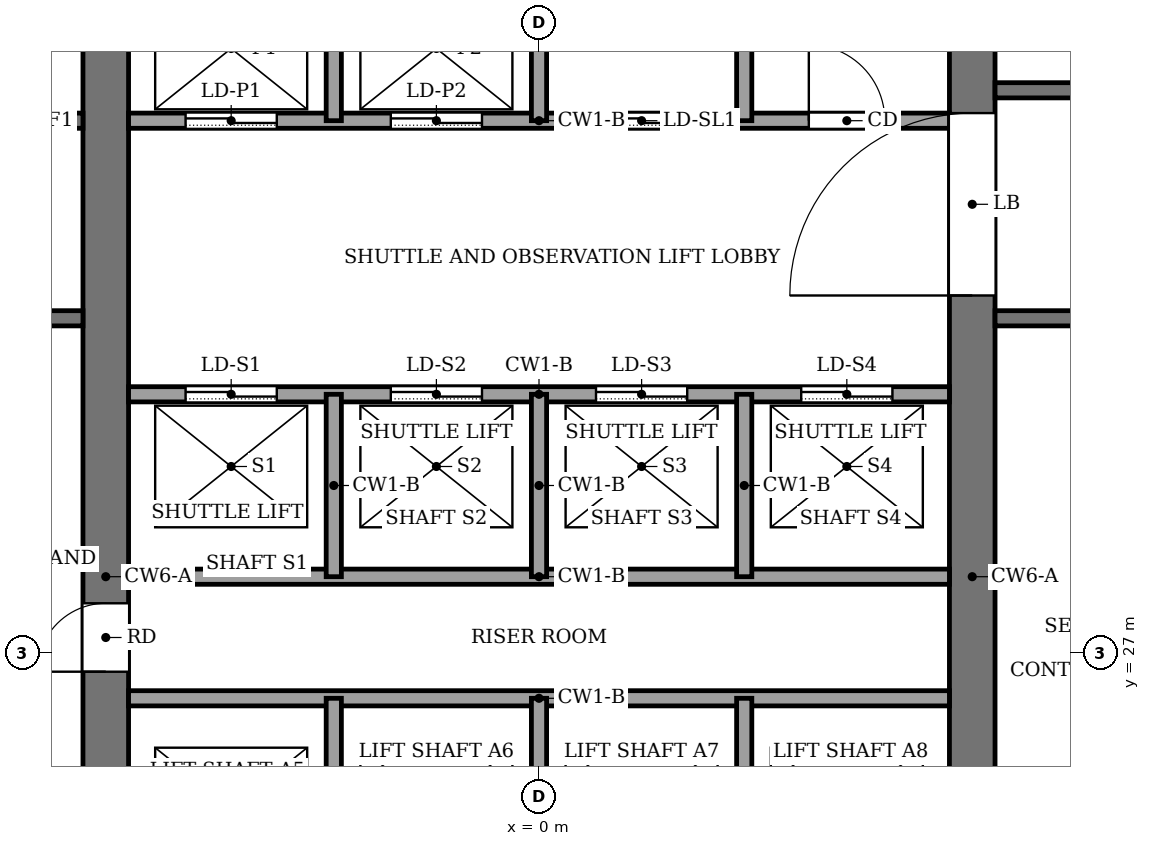
"""IFC4 building model, lengths in metres.
Left out: names, types, materials, properties, quantities, classifications, styles, units other than length and angle.
Written with IfcOpenShell. Run it as: python <this file> out.ifc"""

import sys

from ifc_helpers import new_model, si_unit, direction, frame, frame_2d, origin, place, context, subcontext, project, spatial, rectangle, extrude, element, fill, save


model = new_model("IFC4")
c1 = context("Model", 3, precision=1e-05, world=origin(), true_north=direction((0.0, 1.0)))
c2 = subcontext(c1, "Body", "Model", "MODEL_VIEW")
j1 = project(units=[si_unit("LENGTHUNIT", "METRE"), si_unit("PLANEANGLEUNIT", "RADIAN")], contexts=[c1])
p1 = place(None, origin())
s1 = spatial("IfcSite", under=j1, at=p1, CompositionType="ELEMENT")
p2 = place(p1, origin())
s2 = spatial("IfcBuilding", under=s1, at=p2, CompositionType="ELEMENT")
p3 = place(p2, origin())
s3 = spatial("IfcBuildingStorey", under=s2, at=p3, CompositionType="ELEMENT", Elevation=0.0)
p4 = place(p3, frame((-5.7, 18.4, -0.45), z_axis=(0.0, 0.0, 1.0), x_axis=(0.0, 1.0, 0.0)))
e1 = element("IfcWall", 1, at=p4, inside=s3, PredefinedType="SHEAR", context=c2, shape_type="SweptSolid", body=[
    extrude(rectangle(XDim=19.2, YDim=0.6, at=frame_2d((9.6, 0.0))), origin(), (0.0, 0.0, 1.0), 9.32),
])
p5 = place(p4, frame((8.35, 0.0, 0.45)))
e2 = element("IfcOpeningElement", 2, at=p5, cuts=e1, PredefinedType="OPENING", context=c2, shape_type="SweptSolid", body=[
    extrude(rectangle(XDim=0.9, YDim=2.1, at=frame_2d((0.45, 1.05))), frame((0.0, 0.31, 0.0), z_axis=(0.0, -1.0, 0.0), x_axis=(1.0, 0.0, 0.0)), (0.0, 0.0, 1.0), 0.62),
])
p6 = place(p3, frame((5.7, 18.4, -0.45), z_axis=(0.0, 0.0, 1.0), x_axis=(0.0, 1.0, 0.0)))
e3 = element("IfcWall", 3, at=p6, inside=s3, PredefinedType="SHEAR", context=c2, shape_type="SweptSolid", body=[
    extrude(rectangle(XDim=19.2, YDim=0.6, at=frame_2d((9.6, 0.0))), origin(), (0.0, 0.0, 1.0), 9.32),
])
p7 = place(p6, frame((13.3, 0.0, 0.45)))
e4 = element("IfcOpeningElement", 4, at=p7, cuts=e3, PredefinedType="OPENING", context=c2, shape_type="SweptSolid", body=[
    extrude(rectangle(XDim=2.4, YDim=2.4, at=frame_2d((1.2, 1.2))), frame((0.0, 0.31, 0.0), z_axis=(0.0, -1.0, 0.0), x_axis=(1.0, 0.0, 0.0)), (0.0, 0.0, 1.0), 0.62),
])
for number, where, z_axis, x_axis in (
    (5, (-5.4, 26.4, 0.0), (0.0, 0.0, 1.0), (1.0, 0.0, 0.0)),
    (6, (-5.4, 28.0, 0.0), (0.0, 0.0, 1.0), (1.0, 0.0, 0.0)),
):
    element("IfcWall", number, at=place(p3, frame(where, z_axis=z_axis, x_axis=x_axis)), inside=s3, PredefinedType="PARTITIONING", context=c2, shape_type="SweptSolid", body=[
        extrude(rectangle(XDim=10.8, YDim=0.2, at=frame_2d((5.4, 0.0))), origin(), (0.0, 0.0, 1.0), 8.87),
    ])
p8 = place(p3, frame((-5.4, 30.4, 0.0), z_axis=(0.0, 0.0, 1.0), x_axis=(1.0, 0.0, 0.0)))
e7 = element("IfcWall", 7, at=p8, inside=s3, PredefinedType="PARTITIONING", context=c2, shape_type="SweptSolid", body=[
    extrude(rectangle(XDim=10.8, YDim=0.2, at=frame_2d((5.4, 0.0))), origin(), (0.0, 0.0, 1.0), 8.87),
])
p9 = place(p8, frame((0.75, 0.0, 0.0)))
e8 = element("IfcOpeningElement", 8, at=p9, cuts=e7, PredefinedType="OPENING", context=c2, shape_type="SweptSolid", body=[
    extrude(rectangle(XDim=1.2, YDim=2.2, at=frame_2d((0.6, 1.1))), frame((0.0, 0.11, 0.0), z_axis=(0.0, -1.0, 0.0), x_axis=(1.0, 0.0, 0.0)), (0.0, 0.0, 1.0), 0.22),
])
p10 = place(p8, frame((3.45, 0.0, 0.0)))
e9 = element("IfcOpeningElement", 9, at=p10, cuts=e7, PredefinedType="OPENING", context=c2, shape_type="SweptSolid", body=[
    extrude(rectangle(XDim=1.2, YDim=2.2, at=frame_2d((0.6, 1.1))), frame((0.0, 0.11, 0.0), z_axis=(0.0, -1.0, 0.0), x_axis=(1.0, 0.0, 0.0)), (0.0, 0.0, 1.0), 0.22),
])
p11 = place(p8, frame((6.15, 0.0, 0.0)))
e10 = element("IfcOpeningElement", 10, at=p11, cuts=e7, PredefinedType="OPENING", context=c2, shape_type="SweptSolid", body=[
    extrude(rectangle(XDim=1.2, YDim=2.2, at=frame_2d((0.6, 1.1))), frame((0.0, 0.11, 0.0), z_axis=(0.0, -1.0, 0.0), x_axis=(1.0, 0.0, 0.0)), (0.0, 0.0, 1.0), 0.22),
])
p12 = place(p8, frame((8.85, 0.0, 0.0)))
e11 = element("IfcOpeningElement", 11, at=p12, cuts=e7, PredefinedType="OPENING", context=c2, shape_type="SweptSolid", body=[
    extrude(rectangle(XDim=1.2, YDim=2.2, at=frame_2d((0.6, 1.1))), frame((0.0, 0.11, 0.0), z_axis=(0.0, -1.0, 0.0), x_axis=(1.0, 0.0, 0.0)), (0.0, 0.0, 1.0), 0.22),
])
p13 = place(p3, frame((-12.6, 31.4, 0.0), z_axis=(0.0, 0.0, 1.0), x_axis=(1.0, 0.0, 0.0)))
e12 = element("IfcWall", 12, at=p13, inside=s3, PredefinedType="PARTITIONING", context=c2, shape_type="SweptSolid", body=[
    extrude(rectangle(XDim=6.6, YDim=0.2, at=frame_2d((3.3, 0.0))), origin(), (0.0, 0.0, 1.0), 8.87),
])
p14 = place(p13, frame((1.0, 0.0, 0.0)))
e13 = element("IfcOpeningElement", 13, at=p14, cuts=e12, PredefinedType="OPENING", context=c2, shape_type="SweptSolid", body=[
    extrude(rectangle(XDim=1.2, YDim=2.2, at=frame_2d((0.6, 1.1))), frame((0.0, 0.11, 0.0), z_axis=(0.0, -1.0, 0.0), x_axis=(1.0, 0.0, 0.0)), (0.0, 0.0, 1.0), 0.22),
])
p15 = place(p3, frame((6.0, 31.4, 0.0), z_axis=(0.0, 0.0, 1.0), x_axis=(1.0, 0.0, 0.0)))
e14 = element("IfcWall", 14, at=p15, inside=s3, PredefinedType="PARTITIONING", context=c2, shape_type="SweptSolid", body=[
    extrude(rectangle(XDim=6.6, YDim=0.2, at=frame_2d((3.3, 0.0))), origin(), (0.0, 0.0, 1.0), 8.87),
])
p16 = place(p3, frame((-12.6, 34.0, 0.0), z_axis=(0.0, 0.0, 1.0), x_axis=(1.0, 0.0, 0.0)))
e15 = element("IfcWall", 15, at=p16, inside=s3, PredefinedType="PARTITIONING", context=c2, shape_type="SweptSolid", body=[
    extrude(rectangle(XDim=6.6, YDim=0.2, at=frame_2d((3.3, 0.0))), origin(), (0.0, 0.0, 1.0), 8.87),
])
p17 = place(p16, frame((4.7, 0.0, 0.0)))
e16 = element("IfcOpeningElement", 16, at=p17, cuts=e15, PredefinedType="OPENING", context=c2, shape_type="SweptSolid", body=[
    extrude(rectangle(XDim=1.4, YDim=2.2, at=frame_2d((0.7, 1.1))), frame((0.0, 0.11, 0.0), z_axis=(0.0, -1.0, 0.0), x_axis=(1.0, 0.0, 0.0)), (0.0, 0.0, 1.0), 0.22),
])
p18 = place(p16, frame((2.3, 0.0, 0.0)))
e17 = element("IfcOpeningElement", 17, at=p18, cuts=e15, PredefinedType="OPENING", context=c2, shape_type="SweptSolid", body=[
    extrude(rectangle(XDim=1.4, YDim=2.2, at=frame_2d((0.7, 1.1))), frame((0.0, 0.11, 0.0), z_axis=(0.0, -1.0, 0.0), x_axis=(1.0, 0.0, 0.0)), (0.0, 0.0, 1.0), 0.22),
])
p19 = place(p16, frame((0.45, 0.0, 0.0)))
e18 = element("IfcOpeningElement", 18, at=p19, cuts=e15, PredefinedType="OPENING", context=c2, shape_type="SweptSolid", body=[
    extrude(rectangle(XDim=0.9, YDim=2.1, at=frame_2d((0.45, 1.05))), frame((0.0, 0.11, 0.0), z_axis=(0.0, -1.0, 0.0), x_axis=(1.0, 0.0, 0.0)), (0.0, 0.0, 1.0), 0.22),
])
p20 = place(p3, frame((-5.4, 34.0, 0.0), z_axis=(0.0, 0.0, 1.0), x_axis=(1.0, 0.0, 0.0)))
e19 = element("IfcWall", 19, at=p20, inside=s3, PredefinedType="PARTITIONING", context=c2, shape_type="SweptSolid", body=[
    extrude(rectangle(XDim=10.8, YDim=0.2, at=frame_2d((5.4, 0.0))), origin(), (0.0, 0.0, 1.0), 8.87),
])
p21 = place(p20, frame((0.75, 0.0, 0.0)))
e20 = element("IfcOpeningElement", 20, at=p21, cuts=e19, PredefinedType="OPENING", context=c2, shape_type="SweptSolid", body=[
    extrude(rectangle(XDim=1.2, YDim=2.2, at=frame_2d((0.6, 1.1))), frame((0.0, 0.11, 0.0), z_axis=(0.0, -1.0, 0.0), x_axis=(1.0, 0.0, 0.0)), (0.0, 0.0, 1.0), 0.22),
])
p22 = place(p20, frame((3.45, 0.0, 0.0)))
e21 = element("IfcOpeningElement", 21, at=p22, cuts=e19, PredefinedType="OPENING", context=c2, shape_type="SweptSolid", body=[
    extrude(rectangle(XDim=1.2, YDim=2.2, at=frame_2d((0.6, 1.1))), frame((0.0, 0.11, 0.0), z_axis=(0.0, -1.0, 0.0), x_axis=(1.0, 0.0, 0.0)), (0.0, 0.0, 1.0), 0.22),
])
p23 = place(p20, frame((6.15, 0.0, 0.0)))
e22 = element("IfcOpeningElement", 22, at=p23, cuts=e19, PredefinedType="OPENING", context=c2, shape_type="SweptSolid", body=[
    extrude(rectangle(XDim=1.2, YDim=2.2, at=frame_2d((0.6, 1.1))), frame((0.0, 0.11, 0.0), z_axis=(0.0, -1.0, 0.0), x_axis=(1.0, 0.0, 0.0)), (0.0, 0.0, 1.0), 0.22),
])
p24 = place(p20, frame((8.95, 0.0, 0.0)))
e23 = element("IfcOpeningElement", 23, at=p24, cuts=e19, PredefinedType="OPENING", context=c2, shape_type="SweptSolid", body=[
    extrude(rectangle(XDim=1.0, YDim=2.1, at=frame_2d((0.5, 1.05))), frame((0.0, 0.11, 0.0), z_axis=(0.0, -1.0, 0.0), x_axis=(1.0, 0.0, 0.0)), (0.0, 0.0, 1.0), 0.22),
])
p25 = place(p3, frame((6.0, 34.4, 0.0), z_axis=(0.0, 0.0, 1.0), x_axis=(1.0, 0.0, 0.0)))
e24 = element("IfcWall", 24, at=p25, inside=s3, PredefinedType="PARTITIONING", context=c2, shape_type="SweptSolid", body=[
    extrude(rectangle(XDim=6.6, YDim=0.2, at=frame_2d((3.3, 0.0))), origin(), (0.0, 0.0, 1.0), 8.87),
])
p26 = place(p25, frame((4.8, 0.0, 0.0)))
e25 = element("IfcOpeningElement", 25, at=p26, cuts=e24, PredefinedType="OPENING", context=c2, shape_type="SweptSolid", body=[
    extrude(rectangle(XDim=1.2, YDim=2.2, at=frame_2d((0.6, 1.1))), frame((0.0, 0.11, 0.0), z_axis=(0.0, -1.0, 0.0), x_axis=(1.0, 0.0, 0.0)), (0.0, 0.0, 1.0), 0.22),
])
for number, where, z_axis, x_axis in (
    (26, (-2.7, 24.0, 0.0), (0.0, 0.0, 1.0), (0.0, 1.0, 0.0)),
    (27, (-2.7, 28.0, 0.0), (0.0, 0.0, 1.0), (0.0, 1.0, 0.0)),
):
    element("IfcWall", number, at=place(p3, frame(where, z_axis=z_axis, x_axis=x_axis)), inside=s3, PredefinedType="PARTITIONING", context=c2, shape_type="SweptSolid", body=[
        extrude(rectangle(XDim=2.4, YDim=0.2, at=frame_2d((1.2, 0.0))), origin(), (0.0, 0.0, 1.0), 8.87),
    ])
p27 = place(p3, frame((-2.7, 34.0, 0.0), z_axis=(0.0, 0.0, 1.0), x_axis=(0.0, 1.0, 0.0)))
e28 = element("IfcWall", 28, at=p27, inside=s3, PredefinedType="PARTITIONING", context=c2, shape_type="SweptSolid", body=[
    extrude(rectangle(XDim=3.6, YDim=0.2, at=frame_2d((1.8, 0.0))), origin(), (0.0, 0.0, 1.0), 8.87),
])
for number, where, z_axis, x_axis in (
    (29, (0.0, 24.0, 0.0), (0.0, 0.0, 1.0), (0.0, 1.0, 0.0)),
    (30, (0.0, 28.0, 0.0), (0.0, 0.0, 1.0), (0.0, 1.0, 0.0)),
):
    element("IfcWall", number, at=place(p3, frame(where, z_axis=z_axis, x_axis=x_axis)), inside=s3, PredefinedType="PARTITIONING", context=c2, shape_type="SweptSolid", body=[
        extrude(rectangle(XDim=2.4, YDim=0.2, at=frame_2d((1.2, 0.0))), origin(), (0.0, 0.0, 1.0), 8.87),
    ])
p28 = place(p3, frame((0.0, 34.0, 0.0), z_axis=(0.0, 0.0, 1.0), x_axis=(0.0, 1.0, 0.0)))
e31 = element("IfcWall", 31, at=p28, inside=s3, PredefinedType="PARTITIONING", context=c2, shape_type="SweptSolid", body=[
    extrude(rectangle(XDim=3.6, YDim=0.2, at=frame_2d((1.8, 0.0))), origin(), (0.0, 0.0, 1.0), 8.87),
])
for number, where, z_axis, x_axis in (
    (32, (2.7, 24.0, 0.0), (0.0, 0.0, 1.0), (0.0, 1.0, 0.0)),
    (33, (2.7, 28.0, 0.0), (0.0, 0.0, 1.0), (0.0, 1.0, 0.0)),
):
    element("IfcWall", number, at=place(p3, frame(where, z_axis=z_axis, x_axis=x_axis)), inside=s3, PredefinedType="PARTITIONING", context=c2, shape_type="SweptSolid", body=[
        extrude(rectangle(XDim=2.4, YDim=0.2, at=frame_2d((1.2, 0.0))), origin(), (0.0, 0.0, 1.0), 8.87),
    ])
p29 = place(p3, frame((2.7, 34.0, 0.0), z_axis=(0.0, 0.0, 1.0), x_axis=(0.0, 1.0, 0.0)))
e34 = element("IfcWall", 34, at=p29, inside=s3, PredefinedType="PARTITIONING", context=c2, shape_type="SweptSolid", body=[
    extrude(rectangle(XDim=3.6, YDim=0.2, at=frame_2d((1.8, 0.0))), origin(), (0.0, 0.0, 1.0), 8.87),
])
p30 = place(p9, origin())
e35 = element("IfcDoor", 35, at=p30, inside=s3, OperationType="SLIDING_TO_LEFT", PredefinedType="DOOR", context=c2, shape_type="SweptSolid", body=[
    extrude(rectangle(XDim=1.2, YDim=2.2, at=frame_2d((0.6, 1.1))), frame((0.0, 0.025, 0.0), z_axis=(0.0, -1.0, 0.0), x_axis=(1.0, 0.0, 0.0)), (0.0, 0.0, 1.0), 0.05),
])
fill(e8, e35)
p31 = place(p10, origin())
e36 = element("IfcDoor", 36, at=p31, inside=s3, OperationType="SLIDING_TO_LEFT", PredefinedType="DOOR", context=c2, shape_type="SweptSolid", body=[
    extrude(rectangle(XDim=1.2, YDim=2.2, at=frame_2d((0.6, 1.1))), frame((0.0, 0.025, 0.0), z_axis=(0.0, -1.0, 0.0), x_axis=(1.0, 0.0, 0.0)), (0.0, 0.0, 1.0), 0.05),
])
fill(e9, e36)
p32 = place(p11, origin())
e37 = element("IfcDoor", 37, at=p32, inside=s3, OperationType="SLIDING_TO_LEFT", PredefinedType="DOOR", context=c2, shape_type="SweptSolid", body=[
    extrude(rectangle(XDim=1.2, YDim=2.2, at=frame_2d((0.6, 1.1))), frame((0.0, 0.025, 0.0), z_axis=(0.0, -1.0, 0.0), x_axis=(1.0, 0.0, 0.0)), (0.0, 0.0, 1.0), 0.05),
])
fill(e10, e37)
p33 = place(p12, origin())
e38 = element("IfcDoor", 38, at=p33, inside=s3, OperationType="SLIDING_TO_LEFT", PredefinedType="DOOR", context=c2, shape_type="SweptSolid", body=[
    extrude(rectangle(XDim=1.2, YDim=2.2, at=frame_2d((0.6, 1.1))), frame((0.0, 0.025, 0.0), z_axis=(0.0, -1.0, 0.0), x_axis=(1.0, 0.0, 0.0)), (0.0, 0.0, 1.0), 0.05),
])
fill(e11, e38)
p34 = place(p21, origin())
e39 = element("IfcDoor", 39, at=p34, inside=s3, OperationType="SLIDING_TO_LEFT", PredefinedType="DOOR", context=c2, shape_type="SweptSolid", body=[
    extrude(rectangle(XDim=1.2, YDim=2.2, at=frame_2d((0.6, 1.1))), frame((0.0, 0.025, 0.0), z_axis=(0.0, -1.0, 0.0), x_axis=(1.0, 0.0, 0.0)), (0.0, 0.0, 1.0), 0.05),
])
fill(e20, e39)
p35 = place(p22, origin())
e40 = element("IfcDoor", 40, at=p35, inside=s3, OperationType="SLIDING_TO_LEFT", PredefinedType="DOOR", context=c2, shape_type="SweptSolid", body=[
    extrude(rectangle(XDim=1.2, YDim=2.2, at=frame_2d((0.6, 1.1))), frame((0.0, 0.025, 0.0), z_axis=(0.0, -1.0, 0.0), x_axis=(1.0, 0.0, 0.0)), (0.0, 0.0, 1.0), 0.05),
])
fill(e21, e40)
p36 = place(p23, origin())
e41 = element("IfcDoor", 41, at=p36, inside=s3, OperationType="SLIDING_TO_LEFT", PredefinedType="DOOR", context=c2, shape_type="SweptSolid", body=[
    extrude(rectangle(XDim=1.2, YDim=2.2, at=frame_2d((0.6, 1.1))), frame((0.0, 0.025, 0.0), z_axis=(0.0, -1.0, 0.0), x_axis=(1.0, 0.0, 0.0)), (0.0, 0.0, 1.0), 0.05),
])
fill(e22, e41)
p37 = place(p24, origin())
e42 = element("IfcDoor", 42, at=p37, inside=s3, OperationType="SINGLE_SWING_LEFT", PredefinedType="DOOR", context=c2, shape_type="SweptSolid", body=[
    extrude(rectangle(XDim=1.0, YDim=2.1, at=frame_2d((0.5, 1.05))), frame((0.0, 0.025, 0.0), z_axis=(0.0, -1.0, 0.0), x_axis=(1.0, 0.0, 0.0)), (0.0, 0.0, 1.0), 0.05),
])
fill(e23, e42)
p38 = place(p5, origin())
e43 = element("IfcDoor", 43, at=p38, inside=s3, OperationType="SINGLE_SWING_RIGHT", PredefinedType="DOOR", context=c2, shape_type="SweptSolid", body=[
    extrude(rectangle(XDim=0.9, YDim=2.1, at=frame_2d((0.45, 1.05))), frame((0.0, 0.025, 0.0), z_axis=(0.0, -1.0, 0.0), x_axis=(1.0, 0.0, 0.0)), (0.0, 0.0, 1.0), 0.05),
])
fill(e2, e43)
p39 = place(p7, origin())
e44 = element("IfcDoor", 44, at=p39, inside=s3, OperationType="DOUBLE_DOOR_SINGLE_SWING", PredefinedType="DOOR", context=c2, shape_type="SweptSolid", body=[
    extrude(rectangle(XDim=2.4, YDim=2.4, at=frame_2d((1.2, 1.2))), frame((0.0, 0.025, 0.0), z_axis=(0.0, -1.0, 0.0), x_axis=(1.0, 0.0, 0.0)), (0.0, 0.0, 1.0), 0.05),
])
fill(e4, e44)
save(model, sys.argv[1])
